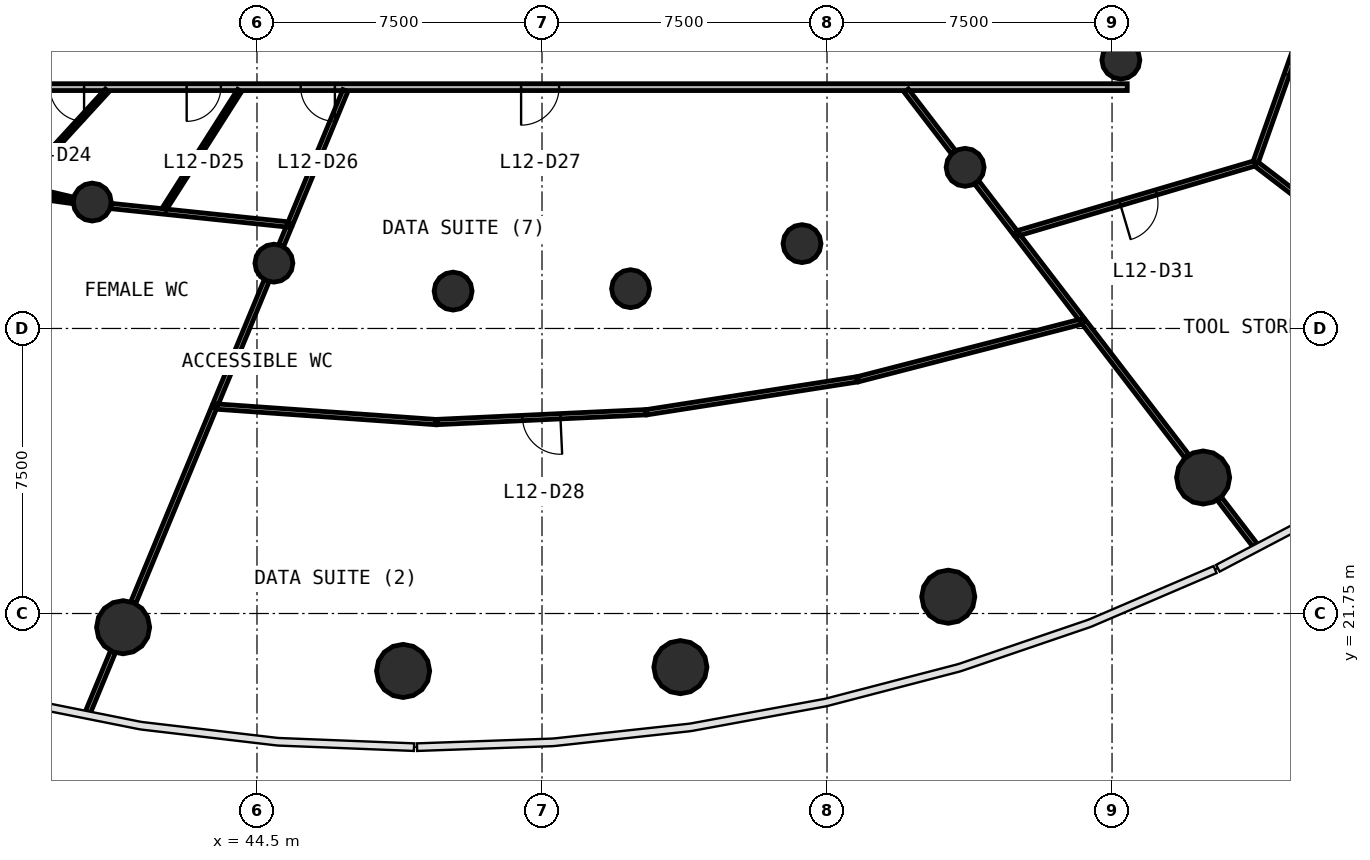
"""IFC4 building model, lengths in metres.
Left out: names, types, materials, properties, quantities, classifications, styles, units other than length and angle.
Written with IfcOpenShell. Run it as: python <this file> out.ifc"""

import sys

from ifc_helpers import new_model, si_unit, direction, frame, frame_2d, origin, origin_2d, place, context, subcontext, project, spatial, rectangle, circle, extrude, source, transform, mapped, element, fill, save


model = new_model("IFC4")
c1 = context("Model", 3, precision=1e-05, world=origin(), true_north=direction((0.0, 1.0)))
c2 = subcontext(c1, "Body", "Model", "MODEL_VIEW")
j1 = project(units=[si_unit("LENGTHUNIT", "METRE"), si_unit("PLANEANGLEUNIT", "RADIAN")], contexts=[c1])
p1 = place(None, origin())
s1 = spatial("IfcSite", under=j1, at=p1, CompositionType="ELEMENT")
p2 = place(p1, origin())
s2 = spatial("IfcBuilding", under=s1, at=p2, CompositionType="ELEMENT")
p3 = place(p2, frame((0.0, 0.0, 53.4)))
s3 = spatial("IfcBuildingStorey", under=s2, at=p3, CompositionType="ELEMENT", Elevation=53.4)
m1 = source(origin(), c2, "Body", "SweptSolid", [
    extrude(circle(Radius=0.7, at=origin_2d()), origin(), (0.0, 0.0, 1.0), 4.4),
])
for number, where, z_axis, x_axis in (
    (1, (40.977, 21.389, 0.0), (0.0, 0.0, 1.0), (1.0, 0.0, 0.0)),
    (2, (48.345, 20.239, 0.0), (0.0, 0.0, 1.0), (1.0, 0.0, 0.0)),
    (3, (55.642, 20.339, 0.0), (0.0, 0.0, 1.0), (1.0, 0.0, 0.0)),
    (4, (62.69, 22.191, 0.0), (0.0, 0.0, 1.0), (1.0, 0.0, 0.0)),
    (5, (69.396, 25.328, 0.0), (0.0, 0.0, 1.0), (1.0, 0.0, 0.0)),
):
    element("IfcColumn", number, at=place(p3, frame(where, z_axis=z_axis, x_axis=x_axis)), inside=s3, PredefinedType="COLUMN", context=c2, shape_type="MappedRepresentation", body=[
        mapped(m1, transform((0.0, 0.0, 0.0), scale=1.0)),
    ])
m2 = source(origin(), c2, "Body", "SweptSolid", [
    extrude(circle(Radius=0.5, at=origin_2d()), origin(), (0.0, 0.0, 1.0), 4.4),
])
for number, where, z_axis, x_axis in (
    (6, (40.165, 32.576, 0.0), (0.0, 0.0, 1.0), (1.0, 0.0, 0.0)),
    (7, (44.945, 30.969, 0.0), (0.0, 0.0, 1.0), (1.0, 0.0, 0.0)),
    (8, (49.661, 30.233, 0.0), (0.0, 0.0, 1.0), (1.0, 0.0, 0.0)),
    (9, (54.331, 30.297, 0.0), (0.0, 0.0, 1.0), (1.0, 0.0, 0.0)),
    (10, (58.842, 31.482, 0.0), (0.0, 0.0, 1.0), (1.0, 0.0, 0.0)),
    (11, (63.134, 33.49, 0.0), (0.0, 0.0, 1.0), (1.0, 0.0, 0.0)),
    (12, (67.232, 36.312, 0.0), (0.0, 0.0, 1.0), (1.0, 0.0, 0.0)),
):
    element("IfcColumn", number, at=place(p3, frame(where, z_axis=z_axis, x_axis=x_axis)), inside=s3, PredefinedType="COLUMN", context=c2, shape_type="MappedRepresentation", body=[
        mapped(m2, transform((0.0, 0.0, 0.0), scale=1.0)),
    ])
p4 = place(p3, frame((67.4, 35.6, 0.0), z_axis=(0.0, 0.0, 1.0), x_axis=(-1.0, 0.0, 0.0)))
e13 = element("IfcWall", 13, at=p4, inside=s3, PredefinedType="PARTITIONING", context=c2, shape_type="SweptSolid", body=[
    extrude(rectangle(XDim=30.8, YDim=0.18, at=frame_2d((15.4, 0.0))), origin(), (0.0, 0.0, 1.0), 3.05),
])
p5 = place(p4, frame((27.45, 0.0, 0.0)))
e14 = element("IfcOpeningElement", 14, at=p5, cuts=e13, PredefinedType="OPENING", context=c2, shape_type="SweptSolid", body=[
    extrude(rectangle(XDim=0.9, YDim=2.1, at=frame_2d((0.45, 1.05))), frame((0.0, 0.1, 0.0), z_axis=(0.0, -1.0, 0.0), x_axis=(1.0, 0.0, 0.0)), (0.0, 0.0, 1.0), 0.2),
])
p6 = place(p4, frame((23.85, 0.0, 0.0)))
e15 = element("IfcOpeningElement", 15, at=p6, cuts=e13, PredefinedType="OPENING", context=c2, shape_type="SweptSolid", body=[
    extrude(rectangle(XDim=0.9, YDim=2.1, at=frame_2d((0.45, 1.05))), frame((0.0, 0.1, 0.0), z_axis=(0.0, -1.0, 0.0), x_axis=(1.0, 0.0, 0.0)), (0.0, 0.0, 1.0), 0.2),
])
p7 = place(p4, frame((20.85, 0.0, 0.0)))
e16 = element("IfcOpeningElement", 16, at=p7, cuts=e13, PredefinedType="OPENING", context=c2, shape_type="SweptSolid", body=[
    extrude(rectangle(XDim=0.9, YDim=2.1, at=frame_2d((0.45, 1.05))), frame((0.0, 0.1, 0.0), z_axis=(0.0, -1.0, 0.0), x_axis=(1.0, 0.0, 0.0)), (0.0, 0.0, 1.0), 0.2),
])
p8 = place(p4, frame((14.95, 0.0, 0.0)))
e17 = element("IfcOpeningElement", 17, at=p8, cuts=e13, PredefinedType="OPENING", context=c2, shape_type="SweptSolid", body=[
    extrude(rectangle(XDim=1.0, YDim=2.1, at=frame_2d((0.5, 1.05))), frame((0.0, 0.1, 0.0), z_axis=(0.0, -1.0, 0.0), x_axis=(1.0, 0.0, 0.0)), (0.0, 0.0, 1.0), 0.2),
])
p9 = place(p3, frame((70.769, 33.598, 0.0), z_axis=(0.0, 0.0, 1.0), x_axis=(-0.959164410747, -0.282849134974, 0.0)))
e18 = element("IfcWall", 18, at=p9, inside=s3, PredefinedType="PARTITIONING", context=c2, shape_type="SweptSolid", body=[
    extrude(rectangle(XDim=6.562, YDim=0.14, at=frame_2d((3.281, 0.0))), origin(), (0.0, 0.0, 1.0), 3.05),
])
p10 = place(p9, frame((2.712, 0.0, 0.0)))
e19 = element("IfcOpeningElement", 19, at=p10, cuts=e18, PredefinedType="OPENING", context=c2, shape_type="SweptSolid", body=[
    extrude(rectangle(XDim=1.0, YDim=2.1, at=frame_2d((0.5, 1.05))), frame((0.0, 0.08, 0.0), z_axis=(0.0, -1.0, 0.0), x_axis=(1.0, 0.0, 0.0)), (0.0, 0.0, 1.0), 0.16),
])
p11 = place(p3, frame((72.798, 39.309, 0.0), z_axis=(0.0, 0.0, 1.0), x_axis=(-0.334820387554, -0.942281968456, 0.0)))
e20 = element("IfcWall", 20, at=p11, inside=s3, PredefinedType="PARTITIONING", context=c2, shape_type="SweptSolid", body=[
    extrude(rectangle(XDim=6.031, YDim=0.14, at=frame_2d((3.016, 0.0))), origin(), (0.0, 0.0, 1.0), 3.05),
])
p12 = place(p11, frame((2.581, 0.0, 0.0)))
e21 = element("IfcOpeningElement", 21, at=p12, cuts=e20, PredefinedType="OPENING", context=c2, shape_type="SweptSolid", body=[
    extrude(rectangle(XDim=1.0, YDim=2.1, at=frame_2d((0.5, 1.05))), frame((0.0, 0.08, 0.0), z_axis=(0.0, -1.0, 0.0), x_axis=(1.0, 0.0, 0.0)), (0.0, 0.0, 1.0), 0.16),
])
p13 = place(p3, frame((60.319, 27.916, 0.0), z_axis=(0.0, 0.0, 1.0), x_axis=(0.968340865999, 0.24963166313, 0.0)))
e22 = element("IfcWall", 22, at=p13, inside=s3, PredefinedType="PARTITIONING", context=c2, shape_type="SweptSolid", body=[
    extrude(rectangle(XDim=6.115, YDim=0.14, at=frame_2d((3.057, 0.0))), origin(), (0.0, 0.0, 1.0), 3.05),
])
p14 = place(p3, frame((33.805, 34.009, 0.0), z_axis=(0.0, 0.0, 1.0), x_axis=(0.973632222489, -0.22812342127, 0.0)))
e23 = element("IfcWall", 23, at=p14, inside=s3, PredefinedType="PARTITIONING", context=c2, shape_type="SweptSolid", body=[
    extrude(rectangle(XDim=6.018, YDim=0.14, at=frame_2d((3.009, 0.0))), origin(), (0.0, 0.0, 1.0), 3.05),
])
p15 = place(p3, frame((43.384, 27.199, 0.0), z_axis=(0.0, 0.0, 1.0), x_axis=(0.997508340925, -0.070548634182, 0.0)))
e24 = element("IfcWall", 24, at=p15, inside=s3, PredefinedType="PARTITIONING", context=c2, shape_type="SweptSolid", body=[
    extrude(rectangle(XDim=5.838, YDim=0.14, at=frame_2d((2.919, 0.0))), origin(), (0.0, 0.0, 1.0), 3.05),
])
p16 = place(p3, frame((70.793, 33.58, 0.0), z_axis=(0.0, 0.0, 1.0), x_axis=(0.793369467151, -0.6087404115, 0.0)))
e25 = element("IfcWall", 25, at=p16, inside=s3, PredefinedType="PARTITIONING", context=c2, shape_type="SweptSolid", body=[
    extrude(rectangle(XDim=5.608, YDim=0.14, at=frame_2d((2.804, 0.0))), origin(), (0.0, 0.0, 1.0), 3.05),
])
p17 = place(p3, frame((54.759, 27.047, 0.0), z_axis=(0.0, 0.0, 1.0), x_axis=(0.98802429514, 0.154298386943, 0.0)))
e26 = element("IfcWall", 26, at=p17, inside=s3, PredefinedType="PARTITIONING", context=c2, shape_type="SweptSolid", body=[
    extrude(rectangle(XDim=5.598, YDim=0.14, at=frame_2d((2.799, 0.0))), origin(), (0.0, 0.0, 1.0), 3.05),
])
p18 = place(p3, frame((43.373, 27.171, 0.0), z_axis=(0.0, 0.0, 1.0), x_axis=(-0.382670118501, -0.923885047182, 0.0)))
e27 = element("IfcWall", 27, at=p18, inside=s3, PredefinedType="PARTITIONING", context=c2, shape_type="SweptSolid", body=[
    extrude(rectangle(XDim=5.554, YDim=0.14, at=frame_2d((2.777, 0.0))), origin(), (0.0, 0.0, 1.0), 3.05),
])
p19 = place(p3, frame((54.729, 27.046, 0.0), z_axis=(0.0, 0.0, 1.0), x_axis=(-0.998905899041, -0.046765423781, 0.0)))
e28 = element("IfcWall", 28, at=p19, inside=s3, PredefinedType="PARTITIONING", context=c2, shape_type="SweptSolid", body=[
    extrude(rectangle(XDim=5.497, YDim=0.14, at=frame_2d((2.749, 0.0))), origin(), (0.0, 0.0, 1.0), 3.05),
])
p20 = place(p19, frame((2.247, 0.0, 0.0)))
e29 = element("IfcOpeningElement", 29, at=p20, cuts=e28, PredefinedType="OPENING", context=c2, shape_type="SweptSolid", body=[
    extrude(rectangle(XDim=1.0, YDim=2.1, at=frame_2d((0.5, 1.05))), frame((0.0, 0.08, 0.0), z_axis=(0.0, -1.0, 0.0), x_axis=(1.0, 0.0, 0.0)), (0.0, 0.0, 1.0), 0.16),
])
p21 = place(p3, frame((40.659, 32.472, 0.0), z_axis=(0.0, 0.0, 1.0), x_axis=(0.994613201527, -0.103656062762, 0.0)))
e30 = element("IfcWall", 30, at=p21, inside=s3, PredefinedType="PARTITIONING", context=c2, shape_type="SweptSolid", body=[
    extrude(rectangle(XDim=4.732, YDim=0.14, at=frame_2d((2.366, 0.0))), origin(), (0.0, 0.0, 1.0), 3.05),
])
p22 = place(p3, frame((66.258, 29.418, 0.0), z_axis=(0.0, 0.0, 1.0), x_axis=(0.608774632027, -0.793343209085, 0.0)))
e31 = element("IfcWall", 31, at=p22, inside=s3, PredefinedType="PARTITIONING", context=c2, shape_type="SweptSolid", body=[
    extrude(rectangle(XDim=4.451, YDim=0.14, at=frame_2d((2.226, 0.0))), origin(), (0.0, 0.0, 1.0), 3.05),
])
p23 = place(p3, frame((46.826, 35.51, 0.0), z_axis=(0.0, 0.0, 1.0), x_axis=(-0.382683759209, -0.923879397128, 0.0)))
e32 = element("IfcWall", 32, at=p23, inside=s3, PredefinedType="PARTITIONING", context=c2, shape_type="SweptSolid", body=[
    extrude(rectangle(XDim=3.789, YDim=0.14, at=frame_2d((1.895, 0.0))), origin(), (0.0, 0.0, 1.0), 3.05),
])
p24 = place(p3, frame((44.752, 30.502, 0.0), z_axis=(0.0, 0.0, 1.0), x_axis=(-0.382698672088, -0.923873219864, 0.0)))
e33 = element("IfcWall", 33, at=p24, inside=s3, PredefinedType="PARTITIONING", context=c2, shape_type="SweptSolid", body=[
    extrude(rectangle(XDim=3.502, YDim=0.14, at=frame_2d((1.751, 0.0))), origin(), (0.0, 0.0, 1.0), 3.05),
])
p25 = place(p3, frame((64.521, 31.683, 0.0), z_axis=(0.0, 0.0, 1.0), x_axis=(0.608761578312, -0.793353225727, 0.0)))
e34 = element("IfcWall", 34, at=p25, inside=s3, PredefinedType="PARTITIONING", context=c2, shape_type="SweptSolid", body=[
    extrude(rectangle(XDim=2.748, YDim=0.14, at=frame_2d((1.374, 0.0))), origin(), (0.0, 0.0, 1.0), 3.05),
])
p26 = place(p3, frame((61.584, 35.51, 0.0), z_axis=(0.0, 0.0, 1.0), x_axis=(0.608727763541, -0.793379171578, 0.0)))
e35 = element("IfcWall", 35, at=p26, inside=s3, PredefinedType="PARTITIONING", context=c2, shape_type="SweptSolid", body=[
    extrude(rectangle(XDim=2.042, YDim=0.14, at=frame_2d((1.021, 0.0))), origin(), (0.0, 0.0, 1.0), 3.05),
])
p27 = place(p3, frame((40.708, 20.737, 0.0), z_axis=(0.0, 0.0, 1.0), x_axis=(-0.382632674553, -0.923900555452, 0.0)))
e36 = element("IfcWall", 36, at=p27, inside=s3, PredefinedType="PARTITIONING", context=c2, shape_type="SweptSolid", body=[
    extrude(rectangle(XDim=1.714, YDim=0.14, at=frame_2d((0.857, 0.0))), origin(), (0.0, 0.0, 1.0), 3.05),
])
p28 = place(p3, frame((63.441, 33.09, 0.0), z_axis=(0.0, 0.0, 1.0), x_axis=(0.608812360851, -0.793314256317, 0.0)))
e37 = element("IfcWall", 37, at=p28, inside=s3, PredefinedType="PARTITIONING", context=c2, shape_type="SweptSolid", body=[
    extrude(rectangle(XDim=1.669, YDim=0.14, at=frame_2d((0.834, 0.0))), origin(), (0.0, 0.0, 1.0), 3.05),
])
p29 = place(p3, frame((69.825, 24.77, 0.0), z_axis=(0.0, 0.0, 1.0), x_axis=(0.608816471317, -0.793311101809, 0.0)))
e38 = element("IfcWall", 38, at=p29, inside=s3, PredefinedType="PARTITIONING", context=c2, shape_type="SweptSolid", body=[
    extrude(rectangle(XDim=1.544, YDim=0.14, at=frame_2d((0.772, 0.0))), origin(), (0.0, 0.0, 1.0), 3.05),
])
p30 = place(p3, frame((45.337, 31.914, 0.0), z_axis=(0.0, 0.0, 1.0), x_axis=(-0.382809221062, -0.923827419094, 0.0)))
e39 = element("IfcWall", 39, at=p30, inside=s3, PredefinedType="PARTITIONING", context=c2, shape_type="SweptSolid", body=[
    extrude(rectangle(XDim=0.519, YDim=0.14, at=frame_2d((0.259, 0.0))), origin(), (0.0, 0.0, 1.0), 3.05),
])
p31 = place(p3, frame((44.043, 35.51, 0.0), z_axis=(0.0, 0.0, 1.0), x_axis=(-0.537273404115, -0.843408139177, 0.0)))
e40 = element("IfcWall", 40, at=p31, inside=s3, PredefinedType="PARTITIONING", context=c2, shape_type="SweptSolid", body=[
    extrude(rectangle(XDim=3.692, YDim=0.12, at=frame_2d((1.846, 0.0))), origin(), (0.0, 0.0, 1.0), 3.05),
])
p32 = place(p3, frame((40.555, 35.51, 0.0), z_axis=(0.0, 0.0, 1.0), x_axis=(-0.675566754316, -0.737298827114, 0.0)))
e41 = element("IfcWall", 41, at=p32, inside=s3, PredefinedType="PARTITIONING", context=c2, shape_type="SweptSolid", body=[
    extrude(rectangle(XDim=3.362, YDim=0.12, at=frame_2d((1.681, 0.0))), origin(), (0.0, 0.0, 1.0), 3.05),
])
p33 = place(p3, frame((38.112, 32.808, 0.0), z_axis=(0.0, 0.0, 1.0), x_axis=(0.990488726007, -0.137593908485, 0.0)))
e42 = element("IfcWall", 42, at=p33, inside=s3, PredefinedType="PARTITIONING", context=c2, shape_type="SweptSolid", body=[
    extrude(rectangle(XDim=1.563, YDim=0.12, at=frame_2d((0.782, 0.0))), origin(), (0.0, 0.0, 1.0), 3.05),
])
m3 = source(origin(), c2, "Body", "SweptSolid", [
    extrude(rectangle(XDim=0.9, YDim=2.1, at=frame_2d((0.45, 1.05))), frame((0.0, 0.025, 0.0), z_axis=(0.0, -1.0, 0.0), x_axis=(1.0, 0.0, 0.0)), (0.0, 0.0, 1.0), 0.05),
])
p34 = place(p5, origin())
e43 = element("IfcDoor", 43, at=p34, inside=s3, OperationType="SINGLE_SWING_LEFT", PredefinedType="DOOR", context=c2, shape_type="MappedRepresentation", body=[
    mapped(m3, transform((0.0, 0.0, 0.0), scale=1.0)),
])
fill(e14, e43)
p35 = place(p6, origin())
e44 = element("IfcDoor", 44, at=p35, inside=s3, OperationType="SINGLE_SWING_RIGHT", PredefinedType="DOOR", context=c2, shape_type="MappedRepresentation", body=[
    mapped(m3, transform((0.0, 0.0, 0.0), scale=1.0)),
])
fill(e15, e44)
p36 = place(p7, origin())
e45 = element("IfcDoor", 45, at=p36, inside=s3, OperationType="SINGLE_SWING_LEFT", PredefinedType="DOOR", context=c2, shape_type="MappedRepresentation", body=[
    mapped(m3, transform((0.0, 0.0, 0.0), scale=1.0)),
])
fill(e16, e45)
m4 = source(origin(), c2, "Body", "SweptSolid", [
    extrude(rectangle(XDim=1.0, YDim=2.1, at=frame_2d((0.5, 1.05))), frame((0.0, 0.025, 0.0), z_axis=(0.0, -1.0, 0.0), x_axis=(1.0, 0.0, 0.0)), (0.0, 0.0, 1.0), 0.05),
])
p37 = place(p8, origin())
e46 = element("IfcDoor", 46, at=p37, inside=s3, OperationType="SINGLE_SWING_RIGHT", PredefinedType="DOOR", context=c2, shape_type="MappedRepresentation", body=[
    mapped(m4, transform((0.0, 0.0, 0.0), scale=1.0)),
])
fill(e17, e46)
p38 = place(p20, origin())
e47 = element("IfcDoor", 47, at=p38, inside=s3, OperationType="SINGLE_SWING_LEFT", PredefinedType="DOOR", context=c2, shape_type="MappedRepresentation", body=[
    mapped(m4, transform((0.0, 0.0, 0.0), scale=1.0)),
])
fill(e29, e47)
p39 = place(p10, origin())
e48 = element("IfcDoor", 48, at=p39, inside=s3, OperationType="SINGLE_SWING_RIGHT", PredefinedType="DOOR", context=c2, shape_type="MappedRepresentation", body=[
    mapped(m4, transform((0.0, 0.0, 0.0), scale=1.0)),
])
fill(e19, e48)
p40 = place(p12, origin())
e49 = element("IfcDoor", 49, at=p40, inside=s3, OperationType="SINGLE_SWING_LEFT", PredefinedType="DOOR", context=c2, shape_type="MappedRepresentation", body=[
    mapped(m4, transform((0.0, 0.0, 0.0), scale=1.0)),
])
fill(e21, e49)
save(model, sys.argv[1])
